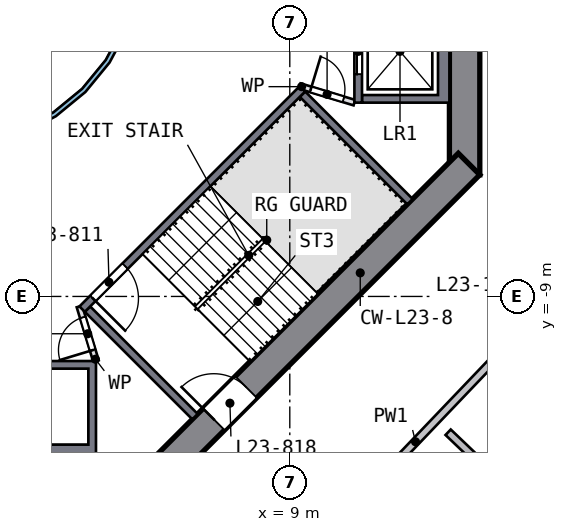
"""IFC4 building model, lengths in metres.
Left out: names, types, materials, properties, quantities, classifications, styles, units other than length and angle.
Written with IfcOpenShell. Run it as: python <this file> out.ifc"""

import sys

from ifc_helpers import new_model, si_unit, direction, frame, frame_2d, origin, place, context, subcontext, project, spatial, polyline, rectangle, outline, extrude, element, fill, save


model = new_model("IFC4")
c1 = context("Model", 3, precision=1e-05, world=origin(), true_north=direction((0.0, 1.0)))
c2 = subcontext(c1, "Body", "Model", "MODEL_VIEW")
j1 = project(units=[si_unit("LENGTHUNIT", "METRE"), si_unit("PLANEANGLEUNIT", "RADIAN")], contexts=[c1])
p1 = place(None, origin())
s1 = spatial("IfcSite", under=j1, at=p1, CompositionType="ELEMENT")
p2 = place(p1, origin())
s2 = spatial("IfcBuilding", under=s1, at=p2, CompositionType="ELEMENT")
p3 = place(p2, frame((0.0, 0.0, 100.0)))
s3 = spatial("IfcBuildingStorey", under=s2, at=p3, CompositionType="ELEMENT", Elevation=100.0)
p4 = place(p3, frame((13.6, -5.799, 0.0), z_axis=(0.0, 0.0, 1.0), x_axis=(0.0, 1.0, 0.0)))
e1 = element("IfcWall", 1, at=p4, inside=s3, PredefinedType="SHEAR", context=c2, shape_type="SweptSolid", body=[
    extrude(rectangle(XDim=11.598, YDim=0.8, at=frame_2d((5.799, 0.0))), origin(), (0.0, 0.0, 1.0), 3.5),
])
p5 = place(p4, frame((4.899, 0.0, 0.0)))
e2 = element("IfcOpeningElement", 2, at=p5, cuts=e1, PredefinedType="OPENING", context=c2, shape_type="SweptSolid", body=[
    extrude(rectangle(XDim=1.8, YDim=2.1, at=frame_2d((0.9, 1.05))), frame((0.0, 0.41, 0.0), z_axis=(0.0, -1.0, 0.0), x_axis=(1.0, 0.0, 0.0)), (0.0, 0.0, 1.0), 0.82),
])
p6 = place(p3, frame((5.516, -13.717, 0.0), z_axis=(0.0, 0.0, 1.0), x_axis=(0.707106781, 0.707106781, 0.0)))
e3 = element("IfcWall", 3, at=p6, inside=s3, PredefinedType="SHEAR", context=c2, shape_type="SweptSolid", body=[
    extrude(rectangle(XDim=11.598, YDim=0.8, at=frame_2d((5.799, 0.0))), origin(), (0.0, 0.0, 1.0), 3.5),
])
p7 = place(p6, frame((2.099, 0.0, 0.0)))
e4 = element("IfcOpeningElement", 4, at=p7, cuts=e3, PredefinedType="OPENING", context=c2, shape_type="SweptSolid", body=[
    extrude(rectangle(XDim=1.2, YDim=2.1, at=frame_2d((0.6, 1.05))), frame((0.0, 0.41, 0.0), z_axis=(0.0, -1.0, 0.0), x_axis=(1.0, 0.0, 0.0)), (0.0, 0.0, 1.0), 0.82),
])
p8 = place(p3, origin())
e5 = element("IfcWall", 5, at=p8, inside=s3, PredefinedType="SOLIDWALL", context=c2, shape_type="SweptSolid", body=[
    extrude(outline(polyline([(13.2, -3.9), (10.9, -3.9), (10.9, -3.7), (12.9, -3.7), (12.9, -1.4), (10.9, -1.4), (10.9, -1.2), (13.2, -1.2), (13.2, -3.9)])), origin(), (0.0, 0.0, 1.0), 3.19),
])
p9 = place(p3, frame((10.8, -1.2, 0.0), z_axis=(0.0, 0.0, 1.0), x_axis=(0.0, -1.0, 0.0)))
e6 = element("IfcWall", 6, at=p9, inside=s3, PredefinedType="SOLIDWALL", context=c2, shape_type="SweptSolid", body=[
    extrude(rectangle(XDim=2.7, YDim=0.2, at=frame_2d((1.35, 0.0))), origin(), (0.0, 0.0, 1.0), 3.19),
])
p10 = place(p9, frame((0.75, 0.0, 0.0)))
e7 = element("IfcOpeningElement", 7, at=p10, cuts=e6, PredefinedType="OPENING", context=c2, shape_type="SweptSolid", body=[
    extrude(rectangle(XDim=1.2, YDim=2.1, at=frame_2d((0.6, 1.05))), frame((0.0, 0.11, 0.0), z_axis=(0.0, -1.0, 0.0), x_axis=(1.0, 0.0, 0.0)), (0.0, 0.0, 1.0), 0.22),
])
p11 = place(p3, origin())
e8 = element("IfcWall", 8, at=p11, inside=s3, PredefinedType="SOLIDWALL", context=c2, shape_type="SweptSolid", body=[
    extrude(outline(polyline([(3.9, -10.7), (3.9, -13.2), (1.2, -13.2), (1.2, -10.7), (3.9, -10.7)]), holes=[polyline([(1.4, -12.9), (3.7, -12.9), (3.7, -10.9), (1.4, -10.9), (1.4, -12.9)])]), origin(), (0.0, 0.0, 1.0), 3.19),
])
p12 = place(p3, frame((9.334, -3.535, 0.0), z_axis=(0.0, 0.0, 1.0), x_axis=(-0.707106781, -0.707106781, 0.0)))
e9 = element("IfcWall", 9, at=p12, inside=s3, PredefinedType="SOLIDWALL", context=c2, shape_type="SweptSolid", body=[
    extrude(rectangle(XDim=8.2, YDim=0.2, at=frame_2d((4.1, 0.0))), origin(), (0.0, 0.0, 1.0), 3.19),
])
p13 = place(p12, frame((6.6, 0.0, 0.0)))
e10 = element("IfcOpeningElement", 10, at=p13, cuts=e9, PredefinedType="OPENING", context=c2, shape_type="SweptSolid", body=[
    extrude(rectangle(XDim=1.2, YDim=2.1, at=frame_2d((0.6, 1.05))), frame((0.0, 0.11, 0.0), z_axis=(0.0, -1.0, 0.0), x_axis=(1.0, 0.0, 0.0)), (0.0, 0.0, 1.0), 0.22),
])
for number, where, z_axis, x_axis in (
    (11, (3.677, -9.334, 0.0), (0.0, 0.0, 1.0), (0.707, -0.707, 0.0)),
    (12, (9.334, -3.677, 0.0), (0.0, 0.0, 1.0), (0.707, -0.707, 0.0)),
):
    element("IfcWall", number, at=place(p3, frame(where, z_axis=z_axis, x_axis=x_axis)), inside=s3, PredefinedType="SOLIDWALL", context=c2, shape_type="SweptSolid", body=[
        extrude(rectangle(XDim=4.0, YDim=0.2, at=frame_2d((2.0, 0.0))), origin(), (0.0, 0.0, 1.0), 3.19),
    ])
p14 = place(p3, frame((3.9, -10.7, 0.0), z_axis=(0.0, 0.0, 1.0), x_axis=(-0.289808785, 0.957084567, 0.0)))
e13 = element("IfcWall", 13, at=p14, inside=s3, PredefinedType="PARTITIONING", context=c2, shape_type="SweptSolid", body=[
    extrude(rectangle(XDim=1.501, YDim=0.15, at=frame_2d((0.75, 0.0))), origin(), (0.0, 0.0, 1.0), 3.19),
])
p15 = place(p14, frame((0.301, 0.0, 0.0)))
e14 = element("IfcOpeningElement", 14, at=p15, cuts=e13, PredefinedType="OPENING", context=c2, shape_type="SweptSolid", body=[
    extrude(rectangle(XDim=0.9, YDim=2.1, at=frame_2d((0.45, 1.05))), frame((0.0, 0.085, 0.0), z_axis=(0.0, -1.0, 0.0), x_axis=(1.0, 0.0, 0.0)), (0.0, 0.0, 1.0), 0.17),
])
p16 = place(p3, frame((9.263, -3.465, 0.0), z_axis=(0.0, 0.0, 1.0), x_axis=(0.957084567, -0.289808785, 0.0)))
e15 = element("IfcWall", 15, at=p16, inside=s3, PredefinedType="PARTITIONING", context=c2, shape_type="SweptSolid", body=[
    extrude(rectangle(XDim=1.501, YDim=0.15, at=frame_2d((0.75, 0.0))), origin(), (0.0, 0.0, 1.0), 3.19),
])
p17 = place(p16, frame((0.301, 0.0, 0.0)))
e16 = element("IfcOpeningElement", 16, at=p17, cuts=e15, PredefinedType="OPENING", context=c2, shape_type="SweptSolid", body=[
    extrude(rectangle(XDim=0.9, YDim=2.1, at=frame_2d((0.45, 1.05))), frame((0.0, 0.085, 0.0), z_axis=(0.0, -1.0, 0.0), x_axis=(1.0, 0.0, 0.0)), (0.0, 0.0, 1.0), 0.17),
])
p18 = place(p3, origin())
e17 = element("IfcWall", 17, at=p18, inside=s3, PredefinedType="SOLIDWALL", context=c2, shape_type="SweptSolid", body=[
    extrude(outline(polyline([(5.021, -0.999), (4.73, -1.959), (4.257, -2.844), (3.62, -3.62), (2.844, -4.257), (1.959, -4.73), (0.999, -5.021), (0.0, -5.12), (-0.999, -5.021), (-1.959, -4.73), (-2.844, -4.257), (-3.62, -3.62), (-4.257, -2.844), (-4.73, -1.959), (-5.021, -0.999), (-5.12, 0.0), (-5.021, 0.999), (-4.73, 1.959), (-4.257, 2.844), (-3.62, 3.62), (-2.844, 4.257), (-1.959, 4.73), (-0.999, 5.021), (0.0, 5.12), (0.999, 5.021), (1.959, 4.73), (2.844, 4.257), (3.62, 3.62), (4.257, 2.844), (4.73, 1.959), (5.021, 0.999), (5.12, 0.0), (5.021, -0.999)]), holes=[polyline([(4.904, 0.976), (4.619, 1.913), (4.157, 2.778), (3.535, 3.535), (2.778, 4.157), (1.913, 4.619), (0.976, 4.904), (0.0, 5.0), (-0.976, 4.904), (-1.913, 4.619), (-2.778, 4.157), (-3.535, 3.535), (-4.157, 2.778), (-4.619, 1.913), (-4.904, 0.976), (-5.0, 0.0), (-4.904, -0.976), (-4.619, -1.913), (-4.157, -2.778), (-3.535, -3.535), (-2.778, -4.157), (-1.913, -4.619), (-0.976, -4.904), (0.0, -5.0), (0.976, -4.904), (1.913, -4.619), (2.778, -4.157), (3.535, -3.535), (4.157, -2.778), (4.619, -1.913), (4.904, -0.976), (5.0, 0.0), (4.904, 0.976)])]), origin(), (0.0, 0.0, 1.0), 3.19),
])
p19 = place(p3, frame((15.991, -8.968, 0.0), z_axis=(0.0, 0.0, 1.0), x_axis=(-0.690622867, -0.723215082, 0.0)))
e18 = element("IfcWall", 18, at=p19, inside=s3, PredefinedType="SOLIDWALL", context=c2, shape_type="SweptSolid", body=[
    extrude(rectangle(XDim=9.116, YDim=0.2, at=frame_2d((4.558, 0.0))), origin(), (0.0, 0.0, 1.0), 3.19),
])
p20 = place(p19, frame((0.35, 0.0, 0.0)))
e19 = element("IfcOpeningElement", 19, at=p20, cuts=e18, PredefinedType="OPENING", context=c2, shape_type="SweptSolid", body=[
    extrude(rectangle(XDim=1.0, YDim=2.1, at=frame_2d((0.5, 1.05))), frame((0.0, 0.11, 0.0), z_axis=(0.0, -1.0, 0.0), x_axis=(1.0, 0.0, 0.0)), (0.0, 0.0, 1.0), 0.22),
])
p21 = place(p3, frame((13.167, -12.573, 0.0), z_axis=(0.0, 0.0, 1.0), x_axis=(0.723166995, -0.690673221, 0.0)))
e20 = element("IfcWall", 20, at=p21, inside=s3, PredefinedType="SOLIDWALL", context=c2, shape_type="SweptSolid", body=[
    extrude(rectangle(XDim=2.705, YDim=0.2, at=frame_2d((1.353, 0.0))), origin(), (0.0, 0.0, 1.0), 3.19),
])
p22 = place(p10, origin())
e21 = element("IfcDoor", 21, at=p22, inside=s3, OperationType="DOUBLE_DOOR_SLIDING", PredefinedType="DOOR", context=c2, shape_type="SweptSolid", body=[
    extrude(rectangle(XDim=1.2, YDim=2.1, at=frame_2d((0.6, 1.05))), frame((0.0, 0.025, 0.0), z_axis=(0.0, -1.0, 0.0), x_axis=(1.0, 0.0, 0.0)), (0.0, 0.0, 1.0), 0.05),
])
fill(e7, e21)
p23 = place(p13, origin())
e22 = element("IfcDoor", 22, at=p23, inside=s3, OperationType="SINGLE_SWING_RIGHT", PredefinedType="DOOR", context=c2, shape_type="SweptSolid", body=[
    extrude(rectangle(XDim=1.2, YDim=2.1, at=frame_2d((0.6, 1.05))), frame((0.0, 0.025, 0.0), z_axis=(0.0, -1.0, 0.0), x_axis=(1.0, 0.0, 0.0)), (0.0, 0.0, 1.0), 0.05),
])
fill(e10, e22)
p24 = place(p7, origin())
e23 = element("IfcDoor", 23, at=p24, inside=s3, OperationType="SINGLE_SWING_LEFT", PredefinedType="DOOR", context=c2, shape_type="SweptSolid", body=[
    extrude(rectangle(XDim=1.2, YDim=2.1, at=frame_2d((0.6, 1.05))), frame((0.0, 0.025, 0.0), z_axis=(0.0, -1.0, 0.0), x_axis=(1.0, 0.0, 0.0)), (0.0, 0.0, 1.0), 0.05),
])
fill(e4, e23)
p25 = place(p15, origin())
e24 = element("IfcDoor", 24, at=p25, inside=s3, OperationType="SINGLE_SWING_LEFT", PredefinedType="DOOR", context=c2, shape_type="SweptSolid", body=[
    extrude(rectangle(XDim=0.9, YDim=2.1, at=frame_2d((0.45, 1.05))), frame((0.0, 0.025, 0.0), z_axis=(0.0, -1.0, 0.0), x_axis=(1.0, 0.0, 0.0)), (0.0, 0.0, 1.0), 0.05),
])
fill(e14, e24)
p26 = place(p17, origin())
e25 = element("IfcDoor", 25, at=p26, inside=s3, OperationType="SINGLE_SWING_LEFT", PredefinedType="DOOR", context=c2, shape_type="SweptSolid", body=[
    extrude(rectangle(XDim=0.9, YDim=2.1, at=frame_2d((0.45, 1.05))), frame((0.0, 0.025, 0.0), z_axis=(0.0, -1.0, 0.0), x_axis=(1.0, 0.0, 0.0)), (0.0, 0.0, 1.0), 0.05),
])
fill(e16, e25)
save(model, sys.argv[1])
